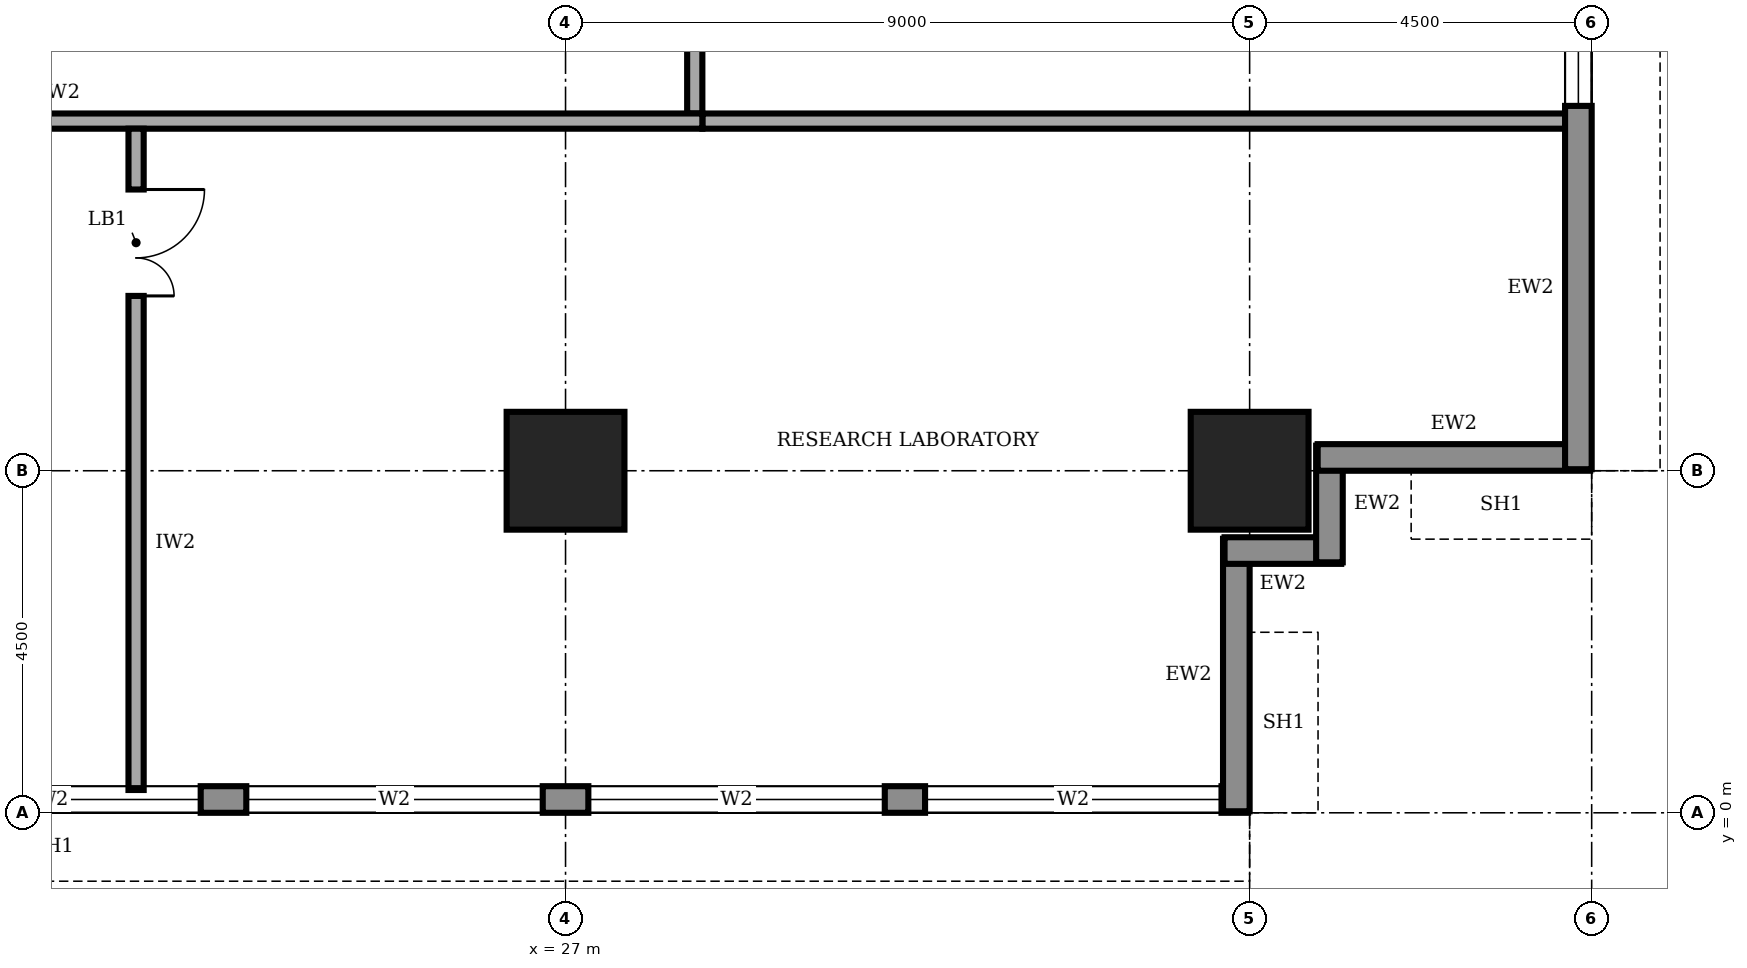
"""IFC4 building model, lengths in metres.
Left out: names, types, materials, properties, quantities, classifications, styles, units other than length and angle.
Written with IfcOpenShell. Run it as: python <this file> out.ifc"""

import sys

from ifc_helpers import new_model, si_unit, direction, frame, frame_2d, origin, origin_2d, place, context, subcontext, project, spatial, rectangle, extrude, element, fill, save


model = new_model("IFC4")
c1 = context("Model", 3, precision=1e-05, world=origin(), true_north=direction((0.0, 1.0)))
c2 = subcontext(c1, "Body", "Model", "MODEL_VIEW")
j1 = project(units=[si_unit("LENGTHUNIT", "METRE"), si_unit("PLANEANGLEUNIT", "RADIAN")], contexts=[c1])
p1 = place(None, origin())
s1 = spatial("IfcSite", under=j1, at=p1, CompositionType="ELEMENT")
p2 = place(p1, origin())
s2 = spatial("IfcBuilding", under=s1, at=p2, CompositionType="ELEMENT")
p3 = place(p2, frame((0.0, 0.0, 229.0)))
s3 = spatial("IfcBuildingStorey", under=s2, at=p3, CompositionType="ELEMENT", Elevation=229.0)
for number, where, z_axis, x_axis in (
    (1, (27.0, 4.5, 0.0), (0.0, 0.0, 1.0), (1.0, 0.0, 0.0)),
    (2, (36.0, 4.5, 0.0), (0.0, 0.0, 1.0), (1.0, 0.0, 0.0)),
):
    element("IfcColumn", number, at=place(p3, frame(where, z_axis=z_axis, x_axis=x_axis)), inside=s3, PredefinedType="COLUMN", context=c2, shape_type="SweptSolid", body=[
        extrude(rectangle(XDim=1.55, YDim=1.55, at=origin_2d()), origin(), (0.0, 0.0, 1.0), 4.0),
    ])
p4 = place(p3, frame((4.52, 0.175, 0.0), z_axis=(0.0, 0.0, 1.0), x_axis=(1.0, 0.0, 0.0)))
e3 = element("IfcWall", 3, at=p4, inside=s3, PredefinedType="STANDARD", context=c2, shape_type="SweptSolid", body=[
    extrude(rectangle(XDim=31.46, YDim=0.35, at=frame_2d((15.73, 0.0))), origin(), (0.0, 0.0, 1.0), 3.75),
])
p5 = place(p4, frame((4.78, 0.0, 0.6)))
e4 = element("IfcOpeningElement", 4, at=p5, cuts=e3, PredefinedType="OPENING", context=c2, shape_type="SweptSolid", body=[
    extrude(rectangle(XDim=3.9, YDim=2.6, at=frame_2d((1.95, 1.3))), frame((0.0, 0.185, 0.0), z_axis=(0.0, -1.0, 0.0), x_axis=(1.0, 0.0, 0.0)), (0.0, 0.0, 1.0), 0.37),
])
p6 = place(p4, frame((9.28, 0.0, 0.6)))
e5 = element("IfcOpeningElement", 5, at=p6, cuts=e3, PredefinedType="OPENING", context=c2, shape_type="SweptSolid", body=[
    extrude(rectangle(XDim=3.9, YDim=2.6, at=frame_2d((1.95, 1.3))), frame((0.0, 0.185, 0.0), z_axis=(0.0, -1.0, 0.0), x_axis=(1.0, 0.0, 0.0)), (0.0, 0.0, 1.0), 0.37),
])
p7 = place(p4, frame((13.78, 0.0, 0.6)))
e6 = element("IfcOpeningElement", 6, at=p7, cuts=e3, PredefinedType="OPENING", context=c2, shape_type="SweptSolid", body=[
    extrude(rectangle(XDim=3.9, YDim=2.6, at=frame_2d((1.95, 1.3))), frame((0.0, 0.185, 0.0), z_axis=(0.0, -1.0, 0.0), x_axis=(1.0, 0.0, 0.0)), (0.0, 0.0, 1.0), 0.37),
])
p8 = place(p4, frame((18.28, 0.0, 0.6)))
e7 = element("IfcOpeningElement", 7, at=p8, cuts=e3, PredefinedType="OPENING", context=c2, shape_type="SweptSolid", body=[
    extrude(rectangle(XDim=3.9, YDim=2.6, at=frame_2d((1.95, 1.3))), frame((0.0, 0.185, 0.0), z_axis=(0.0, -1.0, 0.0), x_axis=(1.0, 0.0, 0.0)), (0.0, 0.0, 1.0), 0.37),
])
p9 = place(p4, frame((22.78, 0.0, 0.6)))
e8 = element("IfcOpeningElement", 8, at=p9, cuts=e3, PredefinedType="OPENING", context=c2, shape_type="SweptSolid", body=[
    extrude(rectangle(XDim=3.9, YDim=2.6, at=frame_2d((1.95, 1.3))), frame((0.0, 0.185, 0.0), z_axis=(0.0, -1.0, 0.0), x_axis=(1.0, 0.0, 0.0)), (0.0, 0.0, 1.0), 0.37),
])
p10 = place(p4, frame((27.21, 0.0, 0.6)))
e9 = element("IfcOpeningElement", 9, at=p10, cuts=e3, PredefinedType="OPENING", context=c2, shape_type="SweptSolid", body=[
    extrude(rectangle(XDim=3.9, YDim=2.6, at=frame_2d((1.95, 1.3))), frame((0.0, 0.185, 0.0), z_axis=(0.0, -1.0, 0.0), x_axis=(1.0, 0.0, 0.0)), (0.0, 0.0, 1.0), 0.37),
])
p11 = place(p3, frame((35.825, 0.02, 0.0), z_axis=(0.0, 0.0, 1.0), x_axis=(0.0, 1.0, 0.0)))
e10 = element("IfcWall", 10, at=p11, inside=s3, PredefinedType="STANDARD", context=c2, shape_type="SweptSolid", body=[
    extrude(rectangle(XDim=3.585, YDim=0.35, at=frame_2d((1.792, 0.0))), origin(), (0.0, 0.0, 1.0), 2.85),
])
for number, where, z_axis, x_axis in (
    (11, (35.67, 3.45, 0.0), (0.0, 0.0, 1.0), (1.0, 0.0, 0.0)),
    (12, (37.05, 3.295, 0.0), (0.0, 0.0, 1.0), (0.0, 1.0, 0.0)),
):
    element("IfcWall", number, at=place(p3, frame(where, z_axis=z_axis, x_axis=x_axis)), inside=s3, PredefinedType="STANDARD", context=c2, shape_type="SweptSolid", body=[
        extrude(rectangle(XDim=1.535, YDim=0.35, at=frame_2d((0.768, 0.0))), origin(), (0.0, 0.0, 1.0), 3.75),
    ])
p12 = place(p3, frame((36.895, 4.675, 0.0), z_axis=(0.0, 0.0, 1.0), x_axis=(1.0, 0.0, 0.0)))
e13 = element("IfcWall", 13, at=p12, inside=s3, PredefinedType="STANDARD", context=c2, shape_type="SweptSolid", body=[
    extrude(rectangle(XDim=3.585, YDim=0.35, at=frame_2d((1.792, 0.0))), origin(), (0.0, 0.0, 1.0), 2.85),
])
p13 = place(p3, frame((40.325, 4.52, 0.0), z_axis=(0.0, 0.0, 1.0), x_axis=(0.0, 1.0, 0.0)))
e14 = element("IfcWall", 14, at=p13, inside=s3, PredefinedType="STANDARD", context=c2, shape_type="SweptSolid", body=[
    extrude(rectangle(XDim=31.46, YDim=0.35, at=frame_2d((15.73, 0.0))), origin(), (0.0, 0.0, 1.0), 3.75),
])
p14 = place(p13, frame((4.78, 0.0, 0.6)))
e15 = element("IfcOpeningElement", 15, at=p14, cuts=e14, PredefinedType="OPENING", context=c2, shape_type="SweptSolid", body=[
    extrude(rectangle(XDim=3.9, YDim=2.6, at=frame_2d((1.95, 1.3))), frame((0.0, 0.185, 0.0), z_axis=(0.0, -1.0, 0.0), x_axis=(1.0, 0.0, 0.0)), (0.0, 0.0, 1.0), 0.37),
])
p15 = place(p13, frame((9.28, 0.0, 0.6)))
e16 = element("IfcOpeningElement", 16, at=p15, cuts=e14, PredefinedType="OPENING", context=c2, shape_type="SweptSolid", body=[
    extrude(rectangle(XDim=3.9, YDim=2.6, at=frame_2d((1.95, 1.3))), frame((0.0, 0.185, 0.0), z_axis=(0.0, -1.0, 0.0), x_axis=(1.0, 0.0, 0.0)), (0.0, 0.0, 1.0), 0.37),
])
p16 = place(p13, frame((13.78, 0.0, 0.6)))
e17 = element("IfcOpeningElement", 17, at=p16, cuts=e14, PredefinedType="OPENING", context=c2, shape_type="SweptSolid", body=[
    extrude(rectangle(XDim=3.9, YDim=2.6, at=frame_2d((1.95, 1.3))), frame((0.0, 0.185, 0.0), z_axis=(0.0, -1.0, 0.0), x_axis=(1.0, 0.0, 0.0)), (0.0, 0.0, 1.0), 0.37),
])
p17 = place(p13, frame((18.28, 0.0, 0.6)))
e18 = element("IfcOpeningElement", 18, at=p17, cuts=e14, PredefinedType="OPENING", context=c2, shape_type="SweptSolid", body=[
    extrude(rectangle(XDim=3.9, YDim=2.6, at=frame_2d((1.95, 1.3))), frame((0.0, 0.185, 0.0), z_axis=(0.0, -1.0, 0.0), x_axis=(1.0, 0.0, 0.0)), (0.0, 0.0, 1.0), 0.37),
])
p18 = place(p13, frame((22.78, 0.0, 0.6)))
e19 = element("IfcOpeningElement", 19, at=p18, cuts=e14, PredefinedType="OPENING", context=c2, shape_type="SweptSolid", body=[
    extrude(rectangle(XDim=3.9, YDim=2.6, at=frame_2d((1.95, 1.3))), frame((0.0, 0.185, 0.0), z_axis=(0.0, -1.0, 0.0), x_axis=(1.0, 0.0, 0.0)), (0.0, 0.0, 1.0), 0.37),
])
p19 = place(p13, frame((27.21, 0.0, 0.6)))
e20 = element("IfcOpeningElement", 20, at=p19, cuts=e14, PredefinedType="OPENING", context=c2, shape_type="SweptSolid", body=[
    extrude(rectangle(XDim=3.9, YDim=2.6, at=frame_2d((1.95, 1.3))), frame((0.0, 0.185, 0.0), z_axis=(0.0, -1.0, 0.0), x_axis=(1.0, 0.0, 0.0)), (0.0, 0.0, 1.0), 0.37),
])
p20 = place(p3, frame((11.9, 9.1, 0.0), z_axis=(0.0, 0.0, 1.0), x_axis=(1.0, 0.0, 0.0)))
e21 = element("IfcWall", 21, at=p20, inside=s3, PredefinedType="SOLIDWALL", context=c2, shape_type="SweptSolid", body=[
    extrude(rectangle(XDim=16.9, YDim=0.2, at=frame_2d((8.45, 0.0))), origin(), (0.0, 0.0, 1.0), 3.75),
])
p21 = place(p3, frame((28.7, 9.2, 0.0), z_axis=(0.0, 0.0, 1.0), x_axis=(0.0, 1.0, 0.0)))
e22 = element("IfcWall", 22, at=p21, inside=s3, PredefinedType="SOLIDWALL", context=c2, shape_type="SweptSolid", body=[
    extrude(rectangle(XDim=23.05, YDim=0.2, at=frame_2d((11.525, 0.0))), origin(), (0.0, 0.0, 1.0), 3.75),
])
p22 = place(p21, frame((3.4, 0.0, 0.0)))
e23 = element("IfcOpeningElement", 23, at=p22, cuts=e22, PredefinedType="OPENING", context=c2, shape_type="SweptSolid", body=[
    extrude(rectangle(XDim=1.8, YDim=2.1, at=frame_2d((0.9, 1.05))), frame((0.0, 0.11, 0.0), z_axis=(0.0, -1.0, 0.0), x_axis=(1.0, 0.0, 0.0)), (0.0, 0.0, 1.0), 0.22),
])
p23 = place(p21, frame((12.4, 0.0, 0.0)))
e24 = element("IfcOpeningElement", 24, at=p23, cuts=e22, PredefinedType="OPENING", context=c2, shape_type="SweptSolid", body=[
    extrude(rectangle(XDim=1.8, YDim=2.1, at=frame_2d((0.9, 1.05))), frame((0.0, 0.11, 0.0), z_axis=(0.0, -1.0, 0.0), x_axis=(1.0, 0.0, 0.0)), (0.0, 0.0, 1.0), 0.22),
])
p24 = place(p21, frame((19.925, 0.0, 0.0)))
e25 = element("IfcOpeningElement", 25, at=p24, cuts=e22, PredefinedType="OPENING", context=c2, shape_type="SweptSolid", body=[
    extrude(rectangle(XDim=1.0, YDim=2.1, at=frame_2d((0.5, 1.05))), frame((0.0, 0.11, 0.0), z_axis=(0.0, -1.0, 0.0), x_axis=(1.0, 0.0, 0.0)), (0.0, 0.0, 1.0), 0.22),
])
p25 = place(p3, frame((21.35, 9.0, 0.0), z_axis=(0.0, 0.0, 1.0), x_axis=(0.0, -1.0, 0.0)))
e26 = element("IfcWall", 26, at=p25, inside=s3, PredefinedType="SOLIDWALL", context=c2, shape_type="SweptSolid", body=[
    extrude(rectangle(XDim=8.7, YDim=0.2, at=frame_2d((4.35, 0.0))), origin(), (0.0, 0.0, 1.0), 3.75),
])
p26 = place(p25, frame((0.8, 0.0, 0.0)))
e27 = element("IfcOpeningElement", 27, at=p26, cuts=e26, PredefinedType="OPENING", context=c2, shape_type="SweptSolid", body=[
    extrude(rectangle(XDim=1.4, YDim=2.1, at=frame_2d((0.7, 1.05))), frame((0.0, 0.11, 0.0), z_axis=(0.0, -1.0, 0.0), x_axis=(1.0, 0.0, 0.0)), (0.0, 0.0, 1.0), 0.22),
])
p27 = place(p3, frame((28.8, 9.1, 0.0), z_axis=(0.0, 0.0, 1.0), x_axis=(1.0, 0.0, 0.0)))
e28 = element("IfcWall", 28, at=p27, inside=s3, PredefinedType="SOLIDWALL", context=c2, shape_type="SweptSolid", body=[
    extrude(rectangle(XDim=11.4, YDim=0.2, at=frame_2d((5.7, 0.0))), origin(), (0.0, 0.0, 1.0), 3.75),
])
p28 = place(p7, origin())
e29 = element("IfcWindow", 29, at=p28, inside=s3, PartitioningType="SINGLE_PANEL", PredefinedType="WINDOW", context=c2, shape_type="SweptSolid", body=[
    extrude(rectangle(XDim=3.9, YDim=2.6, at=frame_2d((1.95, 1.3))), frame((0.0, 0.03, 0.0), z_axis=(0.0, -1.0, 0.0), x_axis=(1.0, 0.0, 0.0)), (0.0, 0.0, 1.0), 0.06),
])
fill(e6, e29)
p29 = place(p8, origin())
e30 = element("IfcWindow", 30, at=p29, inside=s3, PartitioningType="SINGLE_PANEL", PredefinedType="WINDOW", context=c2, shape_type="SweptSolid", body=[
    extrude(rectangle(XDim=3.9, YDim=2.6, at=frame_2d((1.95, 1.3))), frame((0.0, 0.03, 0.0), z_axis=(0.0, -1.0, 0.0), x_axis=(1.0, 0.0, 0.0)), (0.0, 0.0, 1.0), 0.06),
])
fill(e7, e30)
p30 = place(p9, origin())
e31 = element("IfcWindow", 31, at=p30, inside=s3, PartitioningType="SINGLE_PANEL", PredefinedType="WINDOW", context=c2, shape_type="SweptSolid", body=[
    extrude(rectangle(XDim=3.9, YDim=2.6, at=frame_2d((1.95, 1.3))), frame((0.0, 0.03, 0.0), z_axis=(0.0, -1.0, 0.0), x_axis=(1.0, 0.0, 0.0)), (0.0, 0.0, 1.0), 0.06),
])
fill(e8, e31)
p31 = place(p10, origin())
e32 = element("IfcWindow", 32, at=p31, inside=s3, PartitioningType="SINGLE_PANEL", PredefinedType="WINDOW", context=c2, shape_type="SweptSolid", body=[
    extrude(rectangle(XDim=3.9, YDim=2.6, at=frame_2d((1.95, 1.3))), frame((0.0, 0.03, 0.0), z_axis=(0.0, -1.0, 0.0), x_axis=(1.0, 0.0, 0.0)), (0.0, 0.0, 1.0), 0.06),
])
fill(e9, e32)
p32 = place(p14, origin())
e33 = element("IfcWindow", 33, at=p32, inside=s3, PartitioningType="SINGLE_PANEL", PredefinedType="WINDOW", context=c2, shape_type="SweptSolid", body=[
    extrude(rectangle(XDim=3.9, YDim=2.6, at=frame_2d((1.95, 1.3))), frame((0.0, 0.03, 0.0), z_axis=(0.0, -1.0, 0.0), x_axis=(1.0, 0.0, 0.0)), (0.0, 0.0, 1.0), 0.06),
])
fill(e15, e33)
p33 = place(p26, origin())
e34 = element("IfcDoor", 34, at=p33, inside=s3, OperationType="DOUBLE_DOOR_SINGLE_SWING", PredefinedType="DOOR", context=c2, shape_type="SweptSolid", body=[
    extrude(rectangle(XDim=1.4, YDim=2.1, at=frame_2d((0.7, 1.05))), frame((0.0, 0.025, 0.0), z_axis=(0.0, -1.0, 0.0), x_axis=(1.0, 0.0, 0.0)), (0.0, 0.0, 1.0), 0.05),
])
fill(e27, e34)
save(model, sys.argv[1])
